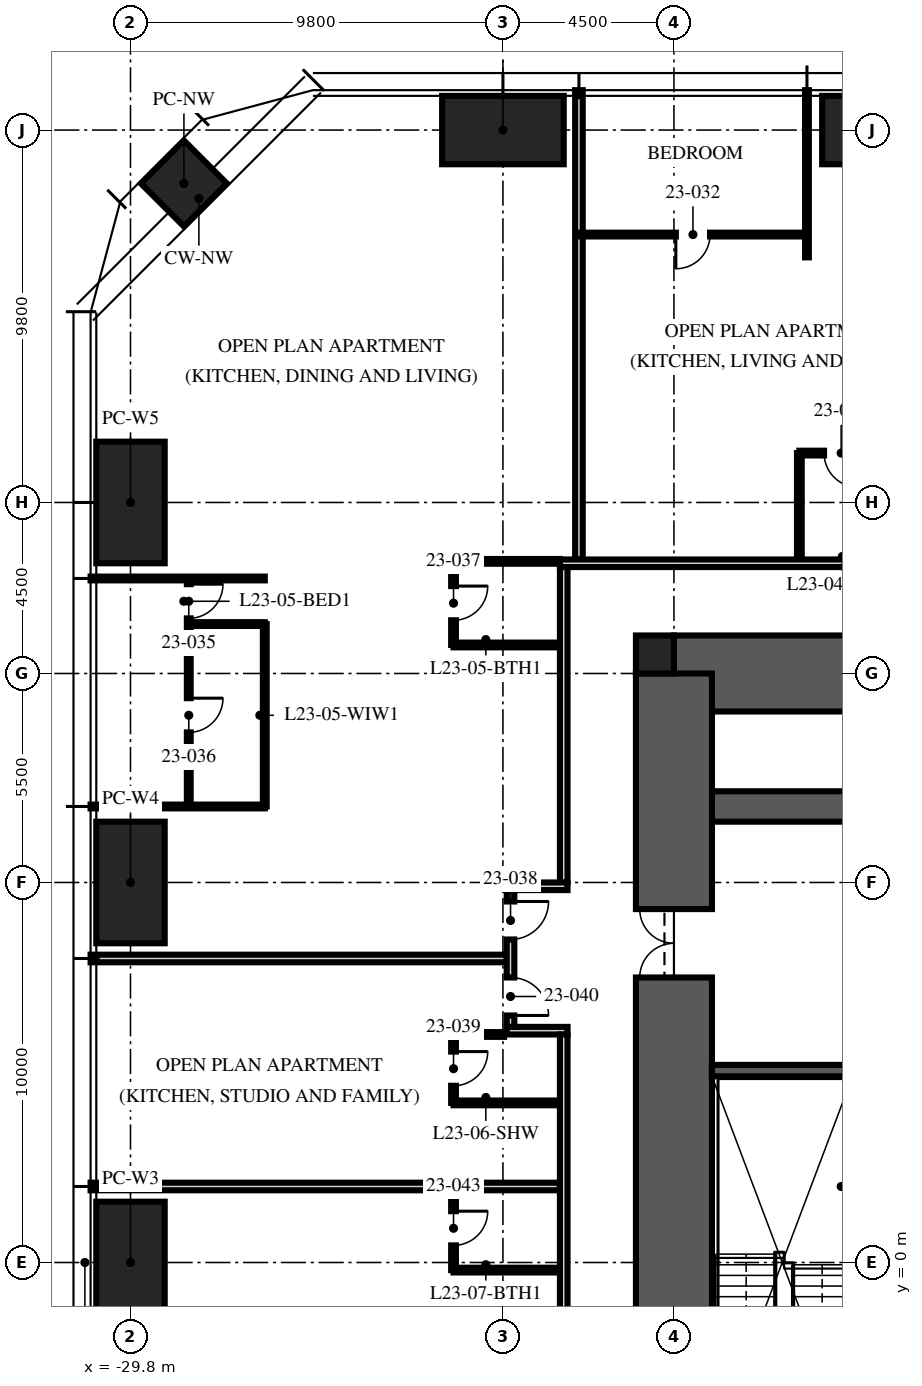
"""IFC4 building model, lengths in metres.
Left out: names, types, materials, properties, quantities, classifications, styles, units other than length and angle.
Written with IfcOpenShell. Run it as: python <this file> out.ifc"""

import sys

from ifc_helpers import new_model, si_unit, direction, frame, frame_2d, origin, origin_2d, place, context, subcontext, project, spatial, rectangle, hollow_rectangle, extrude, element, fill, save


model = new_model("IFC4")
c1 = context("Model", 3, precision=1e-05, world=origin(), true_north=direction((0.0, 1.0)))
c2 = subcontext(c1, "Body", "Model", "MODEL_VIEW")
j1 = project(units=[si_unit("LENGTHUNIT", "METRE"), si_unit("PLANEANGLEUNIT", "RADIAN")], contexts=[c1])
p1 = place(None, origin())
s1 = spatial("IfcSite", under=j1, at=p1, CompositionType="ELEMENT")
p2 = place(p1, origin())
s2 = spatial("IfcBuilding", under=s1, at=p2, CompositionType="ELEMENT")
p3 = place(p2, frame((0.0, 0.0, 92.25)))
s3 = spatial("IfcBuildingStorey", under=s2, at=p3, CompositionType="ELEMENT", Elevation=92.25)
p4 = place(p3, frame((-15.5, 15.5, -0.25), z_axis=(0.0, 0.0, 1.0), x_axis=(1.0, 0.0, 0.0)))
e1 = element("IfcWall", 1, at=p4, inside=s3, PredefinedType="SHEAR", context=c2, shape_type="SweptSolid", body=[
    extrude(rectangle(XDim=31.0, YDim=2.0, at=frame_2d((15.5, 0.0))), origin(), (0.0, 0.0, 1.0), 3.75),
])
p5 = place(p4, frame((10.4, 0.0, 0.25)))
e2 = element("IfcOpeningElement", 2, at=p5, cuts=e1, PredefinedType="OPENING", context=c2, shape_type="SweptSolid", body=[
    extrude(rectangle(XDim=1.1, YDim=2.1, at=frame_2d((0.55, 1.05))), frame((0.0, 1.01, 0.0), z_axis=(0.0, -1.0, 0.0), x_axis=(1.0, 0.0, 0.0)), (0.0, 0.0, 1.0), 2.02),
])
p6 = place(p4, frame((13.5, 0.0, 0.25)))
e3 = element("IfcOpeningElement", 3, at=p6, cuts=e1, PredefinedType="OPENING", context=c2, shape_type="SweptSolid", body=[
    extrude(rectangle(XDim=1.1, YDim=2.1, at=frame_2d((0.55, 1.05))), frame((0.0, 1.01, 0.0), z_axis=(0.0, -1.0, 0.0), x_axis=(1.0, 0.0, 0.0)), (0.0, 0.0, 1.0), 2.02),
])
p7 = place(p4, frame((16.6, 0.0, 0.25)))
e4 = element("IfcOpeningElement", 4, at=p7, cuts=e1, PredefinedType="OPENING", context=c2, shape_type="SweptSolid", body=[
    extrude(rectangle(XDim=1.1, YDim=2.1, at=frame_2d((0.55, 1.05))), frame((0.0, 1.01, 0.0), z_axis=(0.0, -1.0, 0.0), x_axis=(1.0, 0.0, 0.0)), (0.0, 0.0, 1.0), 2.02),
])
p8 = place(p3, frame((-15.5, 12.0, -0.25), z_axis=(0.0, 0.0, 1.0), x_axis=(1.0, 0.0, 0.0)))
e5 = element("IfcWall", 5, at=p8, inside=s3, PredefinedType="SHEAR", context=c2, shape_type="SweptSolid", body=[
    extrude(rectangle(XDim=31.0, YDim=0.8, at=frame_2d((15.5, 0.0))), origin(), (0.0, 0.0, 1.0), 3.75),
])
p9 = place(p3, frame((-15.5, -15.5, -0.25), z_axis=(0.0, 0.0, 1.0), x_axis=(0.0, 1.0, 0.0)))
e6 = element("IfcWall", 6, at=p9, inside=s3, PredefinedType="SHEAR", context=c2, shape_type="SweptSolid", body=[
    extrude(rectangle(XDim=31.0, YDim=2.0, at=frame_2d((15.5, 0.0))), origin(), (0.0, 0.0, 1.0), 3.75),
])
p10 = place(p9, frame((6.5, 0.0, 0.25)))
e7 = element("IfcOpeningElement", 7, at=p10, cuts=e6, PredefinedType="OPENING", context=c2, shape_type="SweptSolid", body=[
    extrude(rectangle(XDim=1.2, YDim=2.1, at=frame_2d((0.6, 1.05))), frame((0.0, 1.01, 0.0), z_axis=(0.0, -1.0, 0.0), x_axis=(1.0, 0.0, 0.0)), (0.0, 0.0, 1.0), 2.02),
])
p11 = place(p9, frame((23.0, 0.0, 0.25)))
e8 = element("IfcOpeningElement", 8, at=p11, cuts=e6, PredefinedType="OPENING", context=c2, shape_type="SweptSolid", body=[
    extrude(rectangle(XDim=1.8, YDim=2.1, at=frame_2d((0.9, 1.05))), frame((0.0, 1.01, 0.0), z_axis=(0.0, -1.0, 0.0), x_axis=(1.0, 0.0, 0.0)), (0.0, 0.0, 1.0), 2.02),
])
p12 = place(p3, frame((-16.0, 16.0, -0.25), z_axis=(0.0, 0.0, 1.0), x_axis=(1.0, 0.0, 0.0)))
e9 = element("IfcColumn", 9, at=p12, inside=s3, PredefinedType="COLUMN", context=c2, shape_type="SweptSolid", body=[
    extrude(rectangle(XDim=1.0, YDim=1.0, at=origin_2d()), origin(), (0.0, 0.0, 1.0), 3.75),
])
for number, where, z_axis, x_axis in (
    (10, (-20.0, 29.8, 0.0), (0.0, 0.0, 1.0), (1.0, 0.0, 0.0)),
    (11, (-10.0, 29.8, 0.0), (0.0, 0.0, 1.0), (1.0, 0.0, 0.0)),
    (12, (-29.8, 0.0, 0.0), (0.0, 0.0, 1.0), (0.0, 1.0, 0.0)),
    (13, (-29.8, 10.0, 0.0), (0.0, 0.0, 1.0), (0.0, 1.0, 0.0)),
    (14, (-29.8, 20.0, 0.0), (0.0, 0.0, 1.0), (0.0, 1.0, 0.0)),
):
    element("IfcColumn", number, at=place(p3, frame(where, z_axis=z_axis, x_axis=x_axis)), inside=s3, PredefinedType="COLUMN", context=c2, shape_type="SweptSolid", body=[
        extrude(hollow_rectangle(XDim=3.2, YDim=1.8, WallThickness=0.2, at=origin_2d()), origin(), (0.0, 0.0, 1.0), 3.75),
    ])
p13 = place(p3, frame((-28.394, 28.394, 0.0), z_axis=(0.0, 0.0, 1.0), x_axis=(0.707106781187, 0.707106781187, 0.0)))
e15 = element("IfcColumn", 15, at=p13, inside=s3, PredefinedType="COLUMN", context=c2, shape_type="SweptSolid", body=[
    extrude(hollow_rectangle(XDim=1.6, YDim=1.6, WallThickness=0.1, at=origin_2d()), origin(), (0.0, 0.0, 1.0), 3.75),
])
p14 = place(p3, frame((-14.5, 5.05, 0.0), z_axis=(0.0, 0.0, 1.0), x_axis=(1.0, 0.0, 0.0)))
e16 = element("IfcWall", 16, at=p14, inside=s3, PredefinedType="SOLIDWALL", context=c2, shape_type="SweptSolid", body=[
    extrude(rectangle(XDim=3.7, YDim=0.3, at=frame_2d((1.85, 0.0))), origin(), (0.0, 0.0, 1.0), 3.5),
])
p15 = place(p3, frame((-12.0, 26.45, 0.0), z_axis=(0.0, 0.0, 1.0), x_axis=(0.0, 1.0, 0.0)))
e17 = element("IfcWall", 17, at=p15, inside=s3, PredefinedType="PARTITIONING", context=c2, shape_type="SweptSolid", body=[
    extrude(rectangle(XDim=4.4, YDim=0.1, at=frame_2d((2.2, 0.0))), origin(), (0.0, 0.0, 1.0), 2.61),
])
p16 = place(p3, frame((-18.0, 18.5, 0.0), z_axis=(0.0, 0.0, 1.0), x_axis=(0.0, 1.0, 0.0)))
e18 = element("IfcWall", 18, at=p16, inside=s3, PredefinedType="PARTITIONING", context=c2, shape_type="SweptSolid", body=[
    extrude(rectangle(XDim=12.35, YDim=0.2, at=frame_2d((6.175, 0.0))), origin(), (0.0, 0.0, 1.0), 2.3),
])
for number, where, z_axis, x_axis in (
    (19, (-26.267, 18.0, 0.0), (0.0, 0.0, 1.0), (-1.0, 0.0, 0.0)),
    (20, (-26.267, 12.0, 0.0), (0.0, 0.0, 1.0), (-1.0, 0.0, 0.0)),
):
    element("IfcWall", number, at=place(p3, frame(where, z_axis=z_axis, x_axis=x_axis)), inside=s3, PredefinedType="PARTITIONING", context=c2, shape_type="SweptSolid", body=[
        extrude(rectangle(XDim=4.583, YDim=0.1, at=frame_2d((2.292, 0.0))), origin(), (0.0, 0.0, 1.0), 2.61),
    ])
p17 = place(p3, frame((-19.9, 8.0, 0.0), z_axis=(0.0, 0.0, 1.0), x_axis=(-1.0, 0.0, 0.0)))
e21 = element("IfcWall", 21, at=p17, inside=s3, PredefinedType="PARTITIONING", context=c2, shape_type="SweptSolid", body=[
    extrude(rectangle(XDim=10.95, YDim=0.2, at=frame_2d((5.475, 0.0))), origin(), (0.0, 0.0, 1.0), 2.61),
])
p18 = place(p3, frame((-18.5, 2.0, 0.0), z_axis=(0.0, 0.0, 1.0), x_axis=(-1.0, 0.0, 0.0)))
e22 = element("IfcWall", 22, at=p18, inside=s3, PredefinedType="PARTITIONING", context=c2, shape_type="SweptSolid", body=[
    extrude(rectangle(XDim=12.35, YDim=0.2, at=frame_2d((6.175, 0.0))), origin(), (0.0, 0.0, 1.0), 2.61),
])
p19 = place(p3, frame((-12.0, 27.05, 0.0), z_axis=(0.0, 0.0, 1.0), x_axis=(-1.0, 0.0, 0.0)))
e23 = element("IfcWall", 23, at=p19, inside=s3, PredefinedType="PARTITIONING", context=c2, shape_type="SweptSolid", body=[
    extrude(rectangle(XDim=6.0, YDim=0.1, at=frame_2d((3.0, 0.0))), origin(), (0.0, 0.0, 1.0), 2.6),
])
p20 = place(p19, frame((2.55, 0.0, 0.0)))
e24 = element("IfcOpeningElement", 24, at=p20, cuts=e23, PredefinedType="OPENING", context=c2, shape_type="SweptSolid", body=[
    extrude(rectangle(XDim=0.9, YDim=2.1, at=frame_2d((0.45, 1.05))), frame((0.0, 0.06, 0.0), z_axis=(0.0, -1.0, 0.0), x_axis=(1.0, 0.0, 0.0)), (0.0, 0.0, 1.0), 0.12),
])
p21 = place(p3, frame((-10.0, 21.3, 0.0), z_axis=(0.0, 0.0, 1.0), x_axis=(-1.0, 0.0, 0.0)))
e25 = element("IfcWall", 25, at=p21, inside=s3, PredefinedType="PARTITIONING", context=c2, shape_type="SweptSolid", body=[
    extrude(rectangle(XDim=2.2, YDim=0.125, at=frame_2d((1.1, 0.0))), origin(), (0.0, 0.0, 1.0), 2.492),
])
p22 = place(p21, frame((0.65, 0.0, 0.0)))
e26 = element("IfcOpeningElement", 26, at=p22, cuts=e25, PredefinedType="OPENING", context=c2, shape_type="SweptSolid", body=[
    extrude(rectangle(XDim=0.9, YDim=2.1, at=frame_2d((0.45, 1.05))), frame((0.0, 0.073, 0.0), z_axis=(0.0, -1.0, 0.0), x_axis=(1.0, 0.0, 0.0)), (0.0, 0.0, 1.0), 0.145),
])
p23 = place(p3, frame((-12.2, 18.5, 0.0), z_axis=(0.0, 0.0, 1.0), x_axis=(0.0, 1.0, 0.0)))
e27 = element("IfcWall", 27, at=p23, inside=s3, PredefinedType="PARTITIONING", context=c2, shape_type="SweptSolid", body=[
    extrude(rectangle(XDim=2.8, YDim=0.125, at=frame_2d((1.4, 0.0))), origin(), (0.0, 0.0, 1.0), 3.5),
])
p24 = place(p3, frame((-28.267, 18.0, 0.0), z_axis=(0.0, 0.0, 1.0), x_axis=(0.0, -1.0, 0.0)))
e28 = element("IfcWall", 28, at=p24, inside=s3, PredefinedType="PARTITIONING", context=c2, shape_type="SweptSolid", body=[
    extrude(rectangle(XDim=6.0, YDim=0.1, at=frame_2d((3.0, 0.0))), origin(), (0.0, 0.0, 1.0), 2.6),
])
p25 = place(p24, frame((0.15, 0.0, 0.0)))
e29 = element("IfcOpeningElement", 29, at=p25, cuts=e28, PredefinedType="OPENING", context=c2, shape_type="SweptSolid", body=[
    extrude(rectangle(XDim=0.9, YDim=2.1, at=frame_2d((0.45, 1.05))), frame((0.0, 0.06, 0.0), z_axis=(0.0, -1.0, 0.0), x_axis=(1.0, 0.0, 0.0)), (0.0, 0.0, 1.0), 0.12),
])
p26 = place(p24, frame((3.15, 0.0, 0.0)))
e30 = element("IfcOpeningElement", 30, at=p26, cuts=e28, PredefinedType="OPENING", context=c2, shape_type="SweptSolid", body=[
    extrude(rectangle(XDim=0.9, YDim=2.1, at=frame_2d((0.45, 1.05))), frame((0.0, 0.06, 0.0), z_axis=(0.0, -1.0, 0.0), x_axis=(1.0, 0.0, 0.0)), (0.0, 0.0, 1.0), 0.12),
])
p27 = place(p3, frame((-26.267, 16.8, 0.0), z_axis=(0.0, 0.0, 1.0), x_axis=(-1.0, 0.0, 0.0)))
e31 = element("IfcWall", 31, at=p27, inside=s3, PredefinedType="PARTITIONING", context=c2, shape_type="SweptSolid", body=[
    extrude(rectangle(XDim=2.0, YDim=0.1, at=frame_2d((1.0, 0.0))), origin(), (0.0, 0.0, 1.0), 3.5),
])
p28 = place(p3, frame((-26.267, 16.8, 0.0), z_axis=(0.0, 0.0, 1.0), x_axis=(0.0, -1.0, 0.0)))
e32 = element("IfcWall", 32, at=p28, inside=s3, PredefinedType="PARTITIONING", context=c2, shape_type="SweptSolid", body=[
    extrude(rectangle(XDim=4.8, YDim=0.1, at=frame_2d((2.4, 0.0))), origin(), (0.0, 0.0, 1.0), 2.6),
])
p29 = place(p3, frame((-21.3, 18.45, 0.0), z_axis=(0.0, 0.0, 1.0), x_axis=(0.0, -1.0, 0.0)))
e33 = element("IfcWall", 33, at=p29, inside=s3, PredefinedType="PARTITIONING", context=c2, shape_type="SweptSolid", body=[
    extrude(rectangle(XDim=2.2, YDim=0.125, at=frame_2d((1.1, 0.0))), origin(), (0.0, 0.0, 1.0), 3.5),
])
p30 = place(p29, frame((0.65, 0.0, 0.0)))
e34 = element("IfcOpeningElement", 34, at=p30, cuts=e33, PredefinedType="OPENING", context=c2, shape_type="SweptSolid", body=[
    extrude(rectangle(XDim=0.9, YDim=2.1, at=frame_2d((0.45, 1.05))), frame((0.0, 0.073, 0.0), z_axis=(0.0, -1.0, 0.0), x_axis=(1.0, 0.0, 0.0)), (0.0, 0.0, 1.0), 0.145),
])
p31 = place(p3, frame((-18.5, 18.45, 0.0), z_axis=(0.0, 0.0, 1.0), x_axis=(-1.0, 0.0, 0.0)))
e35 = element("IfcWall", 35, at=p31, inside=s3, PredefinedType="PARTITIONING", context=c2, shape_type="SweptSolid", body=[
    extrude(rectangle(XDim=2.8, YDim=0.125, at=frame_2d((1.4, 0.0))), origin(), (0.0, 0.0, 1.0), 2.3),
])
p32 = place(p3, frame((-18.5, 16.25, 0.0), z_axis=(0.0, 0.0, 1.0), x_axis=(-1.0, 0.0, 0.0)))
e36 = element("IfcWall", 36, at=p32, inside=s3, PredefinedType="PARTITIONING", context=c2, shape_type="SweptSolid", body=[
    extrude(rectangle(XDim=2.8, YDim=0.125, at=frame_2d((1.4, 0.0))), origin(), (0.0, 0.0, 1.0), 3.5),
])
p33 = place(p3, frame((-21.3, 6.0, 0.0), z_axis=(0.0, 0.0, 1.0), x_axis=(0.0, -1.0, 0.0)))
e37 = element("IfcWall", 37, at=p33, inside=s3, PredefinedType="PARTITIONING", context=c2, shape_type="SweptSolid", body=[
    extrude(rectangle(XDim=1.8, YDim=0.125, at=frame_2d((0.9, 0.0))), origin(), (0.0, 0.0, 1.0), 2.6),
])
p34 = place(p33, frame((0.45, 0.0, 0.0)))
e38 = element("IfcOpeningElement", 38, at=p34, cuts=e37, PredefinedType="OPENING", context=c2, shape_type="SweptSolid", body=[
    extrude(rectangle(XDim=0.9, YDim=2.1, at=frame_2d((0.45, 1.05))), frame((0.0, 0.073, 0.0), z_axis=(0.0, -1.0, 0.0), x_axis=(1.0, 0.0, 0.0)), (0.0, 0.0, 1.0), 0.145),
])
p35 = place(p3, frame((-19.97, 6.0, 0.0), z_axis=(0.0, 0.0, 1.0), x_axis=(-1.0, 0.0, 0.0)))
e39 = element("IfcWall", 39, at=p35, inside=s3, PredefinedType="PARTITIONING", context=c2, shape_type="SweptSolid", body=[
    extrude(rectangle(XDim=1.33, YDim=0.125, at=frame_2d((0.665, 0.0))), origin(), (0.0, 0.0, 1.0), 3.5),
])
p36 = place(p3, frame((-18.5, 4.2, 0.0), z_axis=(0.0, 0.0, 1.0), x_axis=(-1.0, 0.0, 0.0)))
e40 = element("IfcWall", 40, at=p36, inside=s3, PredefinedType="PARTITIONING", context=c2, shape_type="SweptSolid", body=[
    extrude(rectangle(XDim=2.8, YDim=0.125, at=frame_2d((1.4, 0.0))), origin(), (0.0, 0.0, 1.0), 3.5),
])
p37 = place(p3, frame((-21.3, 2.0, 0.0), z_axis=(0.0, 0.0, 1.0), x_axis=(0.0, -1.0, 0.0)))
e41 = element("IfcWall", 41, at=p37, inside=s3, PredefinedType="PARTITIONING", context=c2, shape_type="SweptSolid", body=[
    extrude(rectangle(XDim=2.2, YDim=0.125, at=frame_2d((1.1, 0.0))), origin(), (0.0, 0.0, 1.0), 2.492),
])
p38 = place(p37, frame((0.65, 0.0, 0.0)))
e42 = element("IfcOpeningElement", 42, at=p38, cuts=e41, PredefinedType="OPENING", context=c2, shape_type="SweptSolid", body=[
    extrude(rectangle(XDim=0.9, YDim=2.1, at=frame_2d((0.45, 1.05))), frame((0.0, 0.073, 0.0), z_axis=(0.0, -1.0, 0.0), x_axis=(1.0, 0.0, 0.0)), (0.0, 0.0, 1.0), 0.145),
])
p39 = place(p3, frame((-18.5, -0.2, 0.0), z_axis=(0.0, 0.0, 1.0), x_axis=(-1.0, 0.0, 0.0)))
e43 = element("IfcWall", 43, at=p39, inside=s3, PredefinedType="PARTITIONING", context=c2, shape_type="SweptSolid", body=[
    extrude(rectangle(XDim=2.8, YDim=0.125, at=frame_2d((1.4, 0.0))), origin(), (0.0, 0.0, 1.0), 2.492),
])
p40 = place(p3, frame((-18.5, 18.4, 0.0), z_axis=(0.0, 0.0, 1.0), x_axis=(1.0, 0.0, 0.0)))
e44 = element("IfcWall", 44, at=p40, inside=s3, PredefinedType="PARTITIONING", context=c2, shape_type="SweptSolid", body=[
    extrude(rectangle(XDim=8.5, YDim=0.2, at=frame_2d((4.25, 0.0))), origin(), (0.0, 0.0, 1.0), 2.3),
])
p41 = place(p3, frame((-18.4, 18.3, 0.0), z_axis=(0.0, 0.0, 1.0), x_axis=(0.0, -1.0, 0.0)))
e45 = element("IfcWall", 45, at=p41, inside=s3, PredefinedType="PARTITIONING", context=c2, shape_type="SweptSolid", body=[
    extrude(rectangle(XDim=8.3, YDim=0.2, at=frame_2d((4.15, 0.0))), origin(), (0.0, 0.0, 1.0), 2.3),
])
p42 = place(p3, frame((-18.3, 9.9, 0.0), z_axis=(0.0, 0.0, 1.0), x_axis=(-1.0, 0.0, 0.0)))
e46 = element("IfcWall", 46, at=p42, inside=s3, PredefinedType="PARTITIONING", context=c2, shape_type="SweptSolid", body=[
    extrude(rectangle(XDim=1.6, YDim=0.2, at=frame_2d((0.8, 0.0))), origin(), (0.0, 0.0, 1.0), 2.492),
])
p43 = place(p3, frame((-18.3, 6.1, 0.0), z_axis=(0.0, 0.0, 1.0), x_axis=(-1.0, 0.0, 0.0)))
e47 = element("IfcWall", 47, at=p43, inside=s3, PredefinedType="PARTITIONING", context=c2, shape_type="SweptSolid", body=[
    extrude(rectangle(XDim=1.6, YDim=0.2, at=frame_2d((0.8, 0.0))), origin(), (0.0, 0.0, 1.0), 3.5),
])
p44 = place(p3, frame((-19.8, 9.8, 0.0), z_axis=(0.0, 0.0, 1.0), x_axis=(0.0, -1.0, 0.0)))
e48 = element("IfcWall", 48, at=p44, inside=s3, PredefinedType="PARTITIONING", context=c2, shape_type="SweptSolid", body=[
    extrude(rectangle(XDim=3.6, YDim=0.2, at=frame_2d((1.8, 0.0))), origin(), (0.0, 0.0, 1.0), 3.5),
])
p45 = place(p44, frame((0.3, 0.0, 0.0)))
e49 = element("IfcOpeningElement", 49, at=p45, cuts=e48, PredefinedType="OPENING", context=c2, shape_type="SweptSolid", body=[
    extrude(rectangle(XDim=1.0, YDim=2.2, at=frame_2d((0.5, 1.1))), frame((0.0, 0.11, 0.0), z_axis=(0.0, -1.0, 0.0), x_axis=(1.0, 0.0, 0.0)), (0.0, 0.0, 1.0), 0.22),
])
p46 = place(p44, frame((2.3, 0.0, 0.0)))
e50 = element("IfcOpeningElement", 50, at=p46, cuts=e48, PredefinedType="OPENING", context=c2, shape_type="SweptSolid", body=[
    extrude(rectangle(XDim=1.0, YDim=2.2, at=frame_2d((0.5, 1.1))), frame((0.0, 0.11, 0.0), z_axis=(0.0, -1.0, 0.0), x_axis=(1.0, 0.0, 0.0)), (0.0, 0.0, 1.0), 0.22),
])
p47 = place(p3, frame((-18.4, 6.0, 0.0), z_axis=(0.0, 0.0, 1.0), x_axis=(0.0, -1.0, 0.0)))
e51 = element("IfcWall", 51, at=p47, inside=s3, PredefinedType="PARTITIONING", context=c2, shape_type="SweptSolid", body=[
    extrude(rectangle(XDim=24.3, YDim=0.2, at=frame_2d((12.15, 0.0))), origin(), (0.0, 0.0, 1.0), 2.3),
])
p48 = place(p47, frame((22.27, 0.0, 0.0)))
e52 = element("IfcOpeningElement", 52, at=p48, cuts=e51, PredefinedType="OPENING", context=c2, shape_type="SweptSolid", body=[
    extrude(rectangle(XDim=1.0, YDim=2.2, at=frame_2d((0.5, 1.1))), frame((0.0, 0.11, 0.0), z_axis=(0.0, -1.0, 0.0), x_axis=(1.0, 0.0, 0.0)), (0.0, 0.0, 1.0), 0.22),
])
p49 = place(p11, origin())
e53 = element("IfcDoor", 53, at=p49, inside=s3, OperationType="DOUBLE_DOOR_SINGLE_SWING", PredefinedType="DOOR", context=c2, shape_type="SweptSolid", body=[
    extrude(rectangle(XDim=1.8, YDim=2.1, at=frame_2d((0.9, 1.05))), frame((0.0, 0.025, 0.0), z_axis=(0.0, -1.0, 0.0), x_axis=(1.0, 0.0, 0.0)), (0.0, 0.0, 1.0), 0.05),
])
fill(e8, e53)
p50 = place(p20, origin())
e54 = element("IfcDoor", 54, at=p50, inside=s3, OperationType="SINGLE_SWING_RIGHT", PredefinedType="DOOR", context=c2, shape_type="SweptSolid", body=[
    extrude(rectangle(XDim=0.9, YDim=2.1, at=frame_2d((0.45, 1.05))), frame((0.0, 0.025, 0.0), z_axis=(0.0, -1.0, 0.0), x_axis=(1.0, 0.0, 0.0)), (0.0, 0.0, 1.0), 0.05),
])
fill(e24, e54)
p51 = place(p22, origin())
e55 = element("IfcDoor", 55, at=p51, inside=s3, OperationType="SINGLE_SWING_LEFT", PredefinedType="DOOR", context=c2, shape_type="SweptSolid", body=[
    extrude(rectangle(XDim=0.9, YDim=2.1, at=frame_2d((0.45, 1.05))), frame((0.0, 0.025, 0.0), z_axis=(0.0, -1.0, 0.0), x_axis=(1.0, 0.0, 0.0)), (0.0, 0.0, 1.0), 0.05),
])
fill(e26, e55)
p52 = place(p25, origin())
e56 = element("IfcDoor", 56, at=p52, inside=s3, OperationType="SINGLE_SWING_LEFT", PredefinedType="DOOR", context=c2, shape_type="SweptSolid", body=[
    extrude(rectangle(XDim=0.9, YDim=2.1, at=frame_2d((0.45, 1.05))), frame((0.0, 0.025, 0.0), z_axis=(0.0, -1.0, 0.0), x_axis=(1.0, 0.0, 0.0)), (0.0, 0.0, 1.0), 0.05),
])
fill(e29, e56)
p53 = place(p26, origin())
e57 = element("IfcDoor", 57, at=p53, inside=s3, OperationType="SINGLE_SWING_LEFT", PredefinedType="DOOR", context=c2, shape_type="SweptSolid", body=[
    extrude(rectangle(XDim=0.9, YDim=2.1, at=frame_2d((0.45, 1.05))), frame((0.0, 0.025, 0.0), z_axis=(0.0, -1.0, 0.0), x_axis=(1.0, 0.0, 0.0)), (0.0, 0.0, 1.0), 0.05),
])
fill(e30, e57)
p54 = place(p30, origin())
e58 = element("IfcDoor", 58, at=p54, inside=s3, OperationType="SINGLE_SWING_LEFT", PredefinedType="DOOR", context=c2, shape_type="SweptSolid", body=[
    extrude(rectangle(XDim=0.9, YDim=2.1, at=frame_2d((0.45, 1.05))), frame((0.0, 0.025, 0.0), z_axis=(0.0, -1.0, 0.0), x_axis=(1.0, 0.0, 0.0)), (0.0, 0.0, 1.0), 0.05),
])
fill(e34, e58)
p55 = place(p45, origin())
e59 = element("IfcDoor", 59, at=p55, inside=s3, OperationType="SINGLE_SWING_LEFT", PredefinedType="DOOR", context=c2, shape_type="SweptSolid", body=[
    extrude(rectangle(XDim=1.0, YDim=2.2, at=frame_2d((0.5, 1.1))), frame((0.0, 0.025, 0.0), z_axis=(0.0, -1.0, 0.0), x_axis=(1.0, 0.0, 0.0)), (0.0, 0.0, 1.0), 0.05),
])
fill(e49, e59)
p56 = place(p34, origin())
e60 = element("IfcDoor", 60, at=p56, inside=s3, OperationType="SINGLE_SWING_LEFT", PredefinedType="DOOR", context=c2, shape_type="SweptSolid", body=[
    extrude(rectangle(XDim=0.9, YDim=2.1, at=frame_2d((0.45, 1.05))), frame((0.0, 0.025, 0.0), z_axis=(0.0, -1.0, 0.0), x_axis=(1.0, 0.0, 0.0)), (0.0, 0.0, 1.0), 0.05),
])
fill(e38, e60)
p57 = place(p46, origin())
e61 = element("IfcDoor", 61, at=p57, inside=s3, OperationType="SINGLE_SWING_RIGHT", PredefinedType="DOOR", context=c2, shape_type="SweptSolid", body=[
    extrude(rectangle(XDim=1.0, YDim=2.2, at=frame_2d((0.5, 1.1))), frame((0.0, 0.025, 0.0), z_axis=(0.0, -1.0, 0.0), x_axis=(1.0, 0.0, 0.0)), (0.0, 0.0, 1.0), 0.05),
])
fill(e50, e61)
p58 = place(p38, origin())
e62 = element("IfcDoor", 62, at=p58, inside=s3, OperationType="SINGLE_SWING_LEFT", PredefinedType="DOOR", context=c2, shape_type="SweptSolid", body=[
    extrude(rectangle(XDim=0.9, YDim=2.1, at=frame_2d((0.45, 1.05))), frame((0.0, 0.025, 0.0), z_axis=(0.0, -1.0, 0.0), x_axis=(1.0, 0.0, 0.0)), (0.0, 0.0, 1.0), 0.05),
])
fill(e42, e62)
save(model, sys.argv[1])
